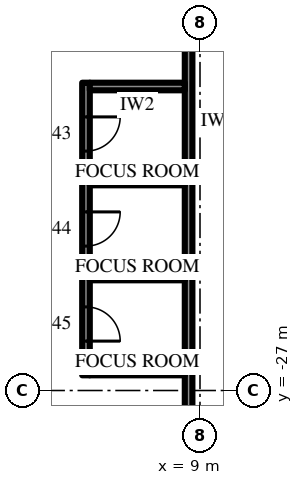
"""IFC4 building model, lengths in metres.
Left out: names, types, materials, properties, quantities, classifications, styles, units other than length and angle.
Written with IfcOpenShell. Run it as: python <this file> out.ifc"""

import sys

from ifc_helpers import new_model, si_unit, direction, frame, frame_2d, origin, place, context, subcontext, project, spatial, rectangle, extrude, element, fill, save


model = new_model("IFC4")
c1 = context("Model", 3, precision=1e-05, world=origin(), true_north=direction((0.0, 1.0)))
c2 = subcontext(c1, "Body", "Model", "MODEL_VIEW")
j1 = project(units=[si_unit("LENGTHUNIT", "METRE"), si_unit("PLANEANGLEUNIT", "RADIAN")], contexts=[c1])
p1 = place(None, origin())
s1 = spatial("IfcSite", under=j1, at=p1, CompositionType="ELEMENT")
p2 = place(p1, origin())
s2 = spatial("IfcBuilding", under=s1, at=p2, CompositionType="ELEMENT")
p3 = place(p2, frame((0.0, 0.0, 140.5)))
s3 = spatial("IfcBuildingStorey", under=s2, at=p3, CompositionType="ELEMENT", Elevation=140.5)
p4 = place(p3, frame((8.7, -12.3, 0.0), z_axis=(0.0, 0.0, 1.0), x_axis=(0.0, -1.0, 0.0)))
e1 = element("IfcWall", 1, at=p4, inside=s3, PredefinedType="PARTITIONING", context=c2, shape_type="SweptSolid", body=[
    extrude(rectangle(XDim=19.0, YDim=0.2, at=frame_2d((9.5, 0.0))), origin(), (0.0, 0.0, 1.0), 4.0),
])
p5 = place(p4, frame((1.4, 0.0, 0.0)))
e2 = element("IfcOpeningElement", 2, at=p5, cuts=e1, PredefinedType="OPENING", context=c2, shape_type="SweptSolid", body=[
    extrude(rectangle(XDim=1.0, YDim=2.2, at=frame_2d((0.5, 1.1))), frame((0.0, 0.11, 0.0), z_axis=(0.0, -1.0, 0.0), x_axis=(1.0, 0.0, 0.0)), (0.0, 0.0, 1.0), 0.22),
])
p6 = place(p3, frame((6.0, -18.9, 0.0), z_axis=(0.0, 0.0, 1.0), x_axis=(0.0, -1.0, 0.0)))
e3 = element("IfcWall", 3, at=p6, inside=s3, PredefinedType="PARTITIONING", context=c2, shape_type="SweptSolid", body=[
    extrude(rectangle(XDim=7.7, YDim=0.2, at=frame_2d((3.85, 0.0))), origin(), (0.0, 0.0, 1.0), 4.0),
])
p7 = place(p6, frame((0.9, 0.0, 0.0)))
e4 = element("IfcOpeningElement", 4, at=p7, cuts=e3, PredefinedType="OPENING", context=c2, shape_type="SweptSolid", body=[
    extrude(rectangle(XDim=0.9, YDim=2.2, at=frame_2d((0.45, 1.1))), frame((0.0, 0.11, 0.0), z_axis=(0.0, -1.0, 0.0), x_axis=(1.0, 0.0, 0.0)), (0.0, 0.0, 1.0), 0.22),
])
p8 = place(p6, frame((3.4, 0.0, 0.0)))
e5 = element("IfcOpeningElement", 5, at=p8, cuts=e3, PredefinedType="OPENING", context=c2, shape_type="SweptSolid", body=[
    extrude(rectangle(XDim=0.9, YDim=2.2, at=frame_2d((0.45, 1.1))), frame((0.0, 0.11, 0.0), z_axis=(0.0, -1.0, 0.0), x_axis=(1.0, 0.0, 0.0)), (0.0, 0.0, 1.0), 0.22),
])
p9 = place(p6, frame((5.9, 0.0, 0.0)))
e6 = element("IfcOpeningElement", 6, at=p9, cuts=e3, PredefinedType="OPENING", context=c2, shape_type="SweptSolid", body=[
    extrude(rectangle(XDim=0.9, YDim=2.2, at=frame_2d((0.45, 1.1))), frame((0.0, 0.11, 0.0), z_axis=(0.0, -1.0, 0.0), x_axis=(1.0, 0.0, 0.0)), (0.0, 0.0, 1.0), 0.22),
])
for number, where, z_axis, x_axis in (
    (7, (8.6, -19.0, 0.0), (0.0, 0.0, 1.0), (-1.0, 0.0, 0.0)),
    (8, (8.6, -21.5, 0.0), (0.0, 0.0, 1.0), (-1.0, 0.0, 0.0)),
    (9, (8.6, -24.0, 0.0), (0.0, 0.0, 1.0), (-1.0, 0.0, 0.0)),
    (10, (8.6, -26.5, 0.0), (0.0, 0.0, 1.0), (-1.0, 0.0, 0.0)),
):
    element("IfcWall", number, at=place(p3, frame(where, z_axis=z_axis, x_axis=x_axis)), inside=s3, PredefinedType="PARTITIONING", context=c2, shape_type="SweptSolid", body=[
        extrude(rectangle(XDim=2.5, YDim=0.2, at=frame_2d((1.25, 0.0))), origin(), (0.0, 0.0, 1.0), 4.0),
    ])
p10 = place(p7, origin())
e11 = element("IfcDoor", 11, at=p10, inside=s3, OperationType="SINGLE_SWING_RIGHT", PredefinedType="DOOR", context=c2, shape_type="SweptSolid", body=[
    extrude(rectangle(XDim=0.9, YDim=2.2, at=frame_2d((0.45, 1.1))), frame((0.0, 0.025, 0.0), z_axis=(0.0, -1.0, 0.0), x_axis=(1.0, 0.0, 0.0)), (0.0, 0.0, 1.0), 0.05),
])
fill(e4, e11)
p11 = place(p8, origin())
e12 = element("IfcDoor", 12, at=p11, inside=s3, OperationType="SINGLE_SWING_RIGHT", PredefinedType="DOOR", context=c2, shape_type="SweptSolid", body=[
    extrude(rectangle(XDim=0.9, YDim=2.2, at=frame_2d((0.45, 1.1))), frame((0.0, 0.025, 0.0), z_axis=(0.0, -1.0, 0.0), x_axis=(1.0, 0.0, 0.0)), (0.0, 0.0, 1.0), 0.05),
])
fill(e5, e12)
p12 = place(p9, origin())
e13 = element("IfcDoor", 13, at=p12, inside=s3, OperationType="SINGLE_SWING_LEFT", PredefinedType="DOOR", context=c2, shape_type="SweptSolid", body=[
    extrude(rectangle(XDim=0.9, YDim=2.2, at=frame_2d((0.45, 1.1))), frame((0.0, 0.025, 0.0), z_axis=(0.0, -1.0, 0.0), x_axis=(1.0, 0.0, 0.0)), (0.0, 0.0, 1.0), 0.05),
])
fill(e6, e13)
save(model, sys.argv[1])
